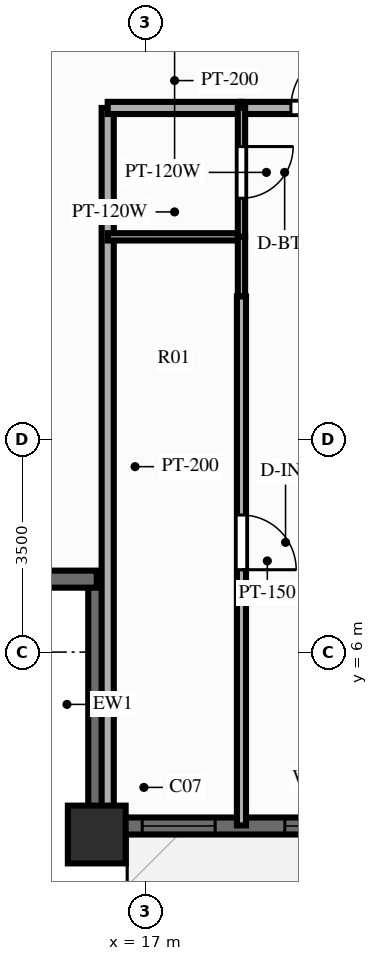
"""IFC4 building model, lengths in metres.
Left out: names, types, materials, properties, quantities, classifications, styles, units other than length and angle.
Written with IfcOpenShell. Run it as: python <this file> out.ifc"""

import sys

from ifc_helpers import new_model, si_unit, direction, frame, frame_2d, origin, origin_2d, place, context, subcontext, project, spatial, rectangle, extrude, source, transform, mapped, element, fill, save


model = new_model("IFC4")
c1 = context("Model", 3, precision=1e-05, world=origin(), true_north=direction((0.0, 1.0)))
c2 = subcontext(c1, "Body", "Model", "MODEL_VIEW")
j1 = project(units=[si_unit("LENGTHUNIT", "METRE"), si_unit("PLANEANGLEUNIT", "RADIAN")], contexts=[c1])
p1 = place(None, origin())
s1 = spatial("IfcSite", under=j1, at=p1, CompositionType="ELEMENT")
p2 = place(p1, origin())
s2 = spatial("IfcBuilding", under=s1, at=p2, CompositionType="ELEMENT")
p3 = place(p2, frame((0.0, 0.0, 77.85)))
s3 = spatial("IfcBuildingStorey", under=s2, at=p3, CompositionType="ELEMENT", Elevation=77.85)
m1 = source(origin(), c2, "Body", "SweptSolid", [
    extrude(rectangle(XDim=0.95, YDim=0.95, at=origin_2d()), origin(), (0.0, 0.0, 1.0), 3.0),
])
p4 = place(p3, frame((16.2, 3.0, 0.0), z_axis=(0.0, 0.0, 1.0), x_axis=(1.0, 0.0, 0.0)))
e1 = element("IfcColumn", 1, at=p4, inside=s3, PredefinedType="COLUMN", context=c2, shape_type="MappedRepresentation", body=[
    mapped(m1, transform((0.0, 0.0, 0.0), scale=1.0)),
])
p5 = place(p3, frame((16.2, 3.14, 0.0), z_axis=(0.0, 0.0, 1.0), x_axis=(1.0, 0.0, 0.0)))
e2 = element("IfcWall", 2, at=p5, inside=s3, PredefinedType="SOLIDWALL", context=c2, shape_type="SweptSolid", body=[
    extrude(rectangle(XDim=43.6, YDim=0.28, at=frame_2d((21.8, 0.0))), origin(), (0.0, 0.0, 1.0), 2.28),
])
p6 = place(p5, frame((0.748, 0.0, 0.25)))
e3 = element("IfcOpeningElement", 3, at=p6, cuts=e2, PredefinedType="OPENING", context=c2, shape_type="SweptSolid", body=[
    extrude(rectangle(XDim=1.2, YDim=1.5, at=frame_2d((0.6, 0.75))), frame((0.0, 0.152, 0.0), z_axis=(0.0, -1.0, 0.0), x_axis=(1.0, 0.0, 0.0)), (0.0, 0.0, 1.0), 0.304),
])
p7 = place(p5, frame((3.093, 0.0, 0.25)))
e4 = element("IfcOpeningElement", 4, at=p7, cuts=e2, PredefinedType="OPENING", context=c2, shape_type="SweptSolid", body=[
    extrude(rectangle(XDim=1.2, YDim=1.5, at=frame_2d((0.6, 0.75))), frame((0.0, 0.152, 0.0), z_axis=(0.0, -1.0, 0.0), x_axis=(1.0, 0.0, 0.0)), (0.0, 0.0, 1.0), 0.304),
])
p8 = place(p5, frame((5.885, 0.0, 0.25)))
e5 = element("IfcOpeningElement", 5, at=p8, cuts=e2, PredefinedType="OPENING", context=c2, shape_type="SweptSolid", body=[
    extrude(rectangle(XDim=1.2, YDim=1.5, at=frame_2d((0.6, 0.75))), frame((0.0, 0.152, 0.0), z_axis=(0.0, -1.0, 0.0), x_axis=(1.0, 0.0, 0.0)), (0.0, 0.0, 1.0), 0.304),
])
p9 = place(p5, frame((8.463, 0.0, 0.25)))
e6 = element("IfcOpeningElement", 6, at=p9, cuts=e2, PredefinedType="OPENING", context=c2, shape_type="SweptSolid", body=[
    extrude(rectangle(XDim=1.2, YDim=1.5, at=frame_2d((0.6, 0.75))), frame((0.0, 0.152, 0.0), z_axis=(0.0, -1.0, 0.0), x_axis=(1.0, 0.0, 0.0)), (0.0, 0.0, 1.0), 0.304),
])
p10 = place(p5, frame((10.876, 0.0, 0.25)))
e7 = element("IfcOpeningElement", 7, at=p10, cuts=e2, PredefinedType="OPENING", context=c2, shape_type="SweptSolid", body=[
    extrude(rectangle(XDim=1.2, YDim=1.5, at=frame_2d((0.6, 0.75))), frame((0.0, 0.152, 0.0), z_axis=(0.0, -1.0, 0.0), x_axis=(1.0, 0.0, 0.0)), (0.0, 0.0, 1.0), 0.304),
])
p11 = place(p5, frame((13.287, 0.0, 0.25)))
e8 = element("IfcOpeningElement", 8, at=p11, cuts=e2, PredefinedType="OPENING", context=c2, shape_type="SweptSolid", body=[
    extrude(rectangle(XDim=1.2, YDim=1.5, at=frame_2d((0.6, 0.75))), frame((0.0, 0.152, 0.0), z_axis=(0.0, -1.0, 0.0), x_axis=(1.0, 0.0, 0.0)), (0.0, 0.0, 1.0), 0.304),
])
p12 = place(p5, frame((16.521, 0.0, 0.25)))
e9 = element("IfcOpeningElement", 9, at=p12, cuts=e2, PredefinedType="OPENING", context=c2, shape_type="SweptSolid", body=[
    extrude(rectangle(XDim=1.2, YDim=1.5, at=frame_2d((0.6, 0.75))), frame((0.0, 0.152, 0.0), z_axis=(0.0, -1.0, 0.0), x_axis=(1.0, 0.0, 0.0)), (0.0, 0.0, 1.0), 0.304),
])
p13 = place(p5, frame((22.938, 0.0, 0.0), z_axis=(0.0, 0.0, 1.0), x_axis=(-1.0, 0.0, 0.0)))
e10 = element("IfcOpeningElement", 10, at=p13, cuts=e2, PredefinedType="OPENING", context=c2, shape_type="SweptSolid", body=[
    extrude(rectangle(XDim=1.1, YDim=2.15, at=frame_2d((0.55, 1.075))), frame((0.0, 0.152, 0.0), z_axis=(0.0, -1.0, 0.0), x_axis=(1.0, 0.0, 0.0)), (0.0, 0.0, 1.0), 0.304),
])
p14 = place(p5, frame((26.657, 0.0, 0.25)))
e11 = element("IfcOpeningElement", 11, at=p14, cuts=e2, PredefinedType="OPENING", context=c2, shape_type="SweptSolid", body=[
    extrude(rectangle(XDim=0.95, YDim=1.5, at=frame_2d((0.475, 0.75))), frame((0.0, 0.152, 0.0), z_axis=(0.0, -1.0, 0.0), x_axis=(1.0, 0.0, 0.0)), (0.0, 0.0, 1.0), 0.304),
])
p15 = place(p5, frame((28.965, 0.0, 0.25)))
e12 = element("IfcOpeningElement", 12, at=p15, cuts=e2, PredefinedType="OPENING", context=c2, shape_type="SweptSolid", body=[
    extrude(rectangle(XDim=0.7, YDim=1.5, at=frame_2d((0.35, 0.75))), frame((0.0, 0.152, 0.0), z_axis=(0.0, -1.0, 0.0), x_axis=(1.0, 0.0, 0.0)), (0.0, 0.0, 1.0), 0.304),
])
p16 = place(p5, frame((31.158, 0.0, 0.25)))
e13 = element("IfcOpeningElement", 13, at=p16, cuts=e2, PredefinedType="OPENING", context=c2, shape_type="SweptSolid", body=[
    extrude(rectangle(XDim=1.2, YDim=1.5, at=frame_2d((0.6, 0.75))), frame((0.0, 0.152, 0.0), z_axis=(0.0, -1.0, 0.0), x_axis=(1.0, 0.0, 0.0)), (0.0, 0.0, 1.0), 0.304),
])
p17 = place(p5, frame((35.992, 0.0, 0.25)))
e14 = element("IfcOpeningElement", 14, at=p17, cuts=e2, PredefinedType="OPENING", context=c2, shape_type="SweptSolid", body=[
    extrude(rectangle(XDim=1.2, YDim=1.5, at=frame_2d((0.6, 0.75))), frame((0.0, 0.152, 0.0), z_axis=(0.0, -1.0, 0.0), x_axis=(1.0, 0.0, 0.0)), (0.0, 0.0, 1.0), 0.304),
])
p18 = place(p5, frame((40.885, 0.0, 0.25)))
e15 = element("IfcOpeningElement", 15, at=p18, cuts=e2, PredefinedType="OPENING", context=c2, shape_type="SweptSolid", body=[
    extrude(rectangle(XDim=1.2, YDim=1.5, at=frame_2d((0.6, 0.75))), frame((0.0, 0.152, 0.0), z_axis=(0.0, -1.0, 0.0), x_axis=(1.0, 0.0, 0.0)), (0.0, 0.0, 1.0), 0.304),
])
for number, where, z_axis, x_axis in (
    (16, (16.2, 3.08, 0.0), (0.0, 0.0, 1.0), (0.0, 1.0, 0.0)),
    (17, (12.08, 7.2, 0.0), (0.0, 0.0, 1.0), (1.0, 0.0, 0.0)),
):
    element("IfcWall", number, at=place(p3, frame(where, z_axis=z_axis, x_axis=x_axis)), inside=s3, PredefinedType="SOLIDWALL", context=c2, shape_type="SweptSolid", body=[
        extrude(rectangle(XDim=4.12, YDim=0.28, at=frame_2d((2.06, 0.0))), origin(), (0.0, 0.0, 1.0), 2.28),
    ])
p19 = place(p3, frame((16.38, 14.95, 0.0), z_axis=(0.0, 0.0, 1.0), x_axis=(0.0, -1.0, 0.0)))
e18 = element("IfcWall", 18, at=p19, inside=s3, PredefinedType="PARTITIONING", context=c2, shape_type="SweptSolid", body=[
    extrude(rectangle(XDim=11.8, YDim=0.2, at=frame_2d((5.9, 0.0))), origin(), (0.0, 0.0, 1.0), 2.79),
])
p20 = place(p3, frame((16.38, 14.95, 0.0), z_axis=(0.0, 0.0, 1.0), x_axis=(1.0, 0.0, 0.0)))
e19 = element("IfcWall", 19, at=p20, inside=s3, PredefinedType="PARTITIONING", context=c2, shape_type="SweptSolid", body=[
    extrude(rectangle(XDim=2.2, YDim=0.2, at=frame_2d((1.1, 0.0))), origin(), (0.0, 0.0, 1.0), 2.79),
])
p21 = place(p3, frame((18.58, 14.95, 0.0), z_axis=(0.0, 0.0, 1.0), x_axis=(1.0, 0.0, 0.0)))
e20 = element("IfcWall", 20, at=p21, inside=s3, PredefinedType="PARTITIONING", context=c2, shape_type="SweptSolid", body=[
    extrude(rectangle(XDim=2.625, YDim=0.2, at=frame_2d((1.313, 0.0))), origin(), (0.0, 0.0, 1.0), 2.79),
])
p22 = place(p21, frame((0.813, 0.0, 0.0)))
e21 = element("IfcOpeningElement", 21, at=p22, cuts=e20, PredefinedType="OPENING", context=c2, shape_type="SweptSolid", body=[
    extrude(rectangle(XDim=1.0, YDim=2.15, at=frame_2d((0.5, 1.075))), frame((0.0, 0.112, 0.0), z_axis=(0.0, -1.0, 0.0), x_axis=(1.0, 0.0, 0.0)), (0.0, 0.0, 1.0), 0.224),
])
p23 = place(p3, frame((16.38, 12.83, 0.0), z_axis=(0.0, 0.0, 1.0), x_axis=(1.0, 0.0, 0.0)))
e22 = element("IfcWall", 22, at=p23, inside=s3, PredefinedType="PARTITIONING", context=c2, shape_type="SweptSolid", body=[
    extrude(rectangle(XDim=2.2, YDim=0.12, at=frame_2d((1.1, 0.0))), origin(), (0.0, 0.0, 1.0), 2.79),
])
p24 = place(p3, frame((18.58, 14.95, 0.0), z_axis=(0.0, 0.0, 1.0), x_axis=(0.0, -1.0, 0.0)))
e23 = element("IfcWall", 23, at=p24, inside=s3, PredefinedType="PARTITIONING", context=c2, shape_type="SweptSolid", body=[
    extrude(rectangle(XDim=2.12, YDim=0.12, at=frame_2d((1.06, 0.0))), origin(), (0.0, 0.0, 1.0), 2.79),
])
p25 = place(p24, frame((0.635, 0.0, 0.0)))
e24 = element("IfcOpeningElement", 24, at=p25, cuts=e23, PredefinedType="OPENING", context=c2, shape_type="SweptSolid", body=[
    extrude(rectangle(XDim=0.85, YDim=2.05, at=frame_2d((0.425, 1.025))), frame((0.0, 0.072, 0.0), z_axis=(0.0, -1.0, 0.0), x_axis=(1.0, 0.0, 0.0)), (0.0, 0.0, 1.0), 0.144),
])
p26 = place(p3, frame((18.58, 12.83, 0.0), z_axis=(0.0, 0.0, 1.0), x_axis=(0.0, -1.0, 0.0)))
e25 = element("IfcWall", 25, at=p26, inside=s3, PredefinedType="PARTITIONING", context=c2, shape_type="SweptSolid", body=[
    extrude(rectangle(XDim=0.98, YDim=0.12, at=frame_2d((0.49, 0.0))), origin(), (0.0, 0.0, 1.0), 2.79),
])
p27 = place(p3, frame((18.58, 11.85, 0.0), z_axis=(0.0, 0.0, 1.0), x_axis=(0.0, -1.0, 0.0)))
e26 = element("IfcWall", 26, at=p27, inside=s3, PredefinedType="PARTITIONING", context=c2, shape_type="SweptSolid", body=[
    extrude(rectangle(XDim=8.7, YDim=0.15, at=frame_2d((4.35, 0.0))), origin(), (0.0, 0.0, 1.0), 2.79),
])
p28 = place(p27, frame((3.595, 0.0, 0.0)))
e27 = element("IfcOpeningElement", 27, at=p28, cuts=e26, PredefinedType="OPENING", context=c2, shape_type="SweptSolid", body=[
    extrude(rectangle(XDim=0.9, YDim=2.1, at=frame_2d((0.45, 1.05))), frame((0.0, 0.087, 0.0), z_axis=(0.0, -1.0, 0.0), x_axis=(1.0, 0.0, 0.0)), (0.0, 0.0, 1.0), 0.174),
])
m2 = source(origin(), c2, "Body", "SweptSolid", [
    extrude(rectangle(XDim=1.2, YDim=1.5, at=frame_2d((0.6, 0.75))), frame((0.0, 0.03, 0.0), z_axis=(0.0, -1.0, 0.0), x_axis=(1.0, 0.0, 0.0)), (0.0, 0.0, 1.0), 0.06),
])
p29 = place(p6, origin())
e28 = element("IfcWindow", 28, at=p29, inside=s3, PartitioningType="SINGLE_PANEL", PredefinedType="WINDOW", context=c2, shape_type="MappedRepresentation", body=[
    mapped(m2, transform((0.0, 0.0, 0.0), scale=1.0)),
])
fill(e3, e28)
p30 = place(p7, origin())
e29 = element("IfcWindow", 29, at=p30, inside=s3, PartitioningType="SINGLE_PANEL", PredefinedType="WINDOW", context=c2, shape_type="MappedRepresentation", body=[
    mapped(m2, transform((0.0, 0.0, 0.0), scale=1.0)),
])
fill(e4, e29)
m3 = source(origin(), c2, "Body", "SweptSolid", [
    extrude(rectangle(XDim=1.0, YDim=2.15, at=frame_2d((0.5, 1.075))), frame((0.0, 0.025, 0.0), z_axis=(0.0, -1.0, 0.0), x_axis=(1.0, 0.0, 0.0)), (0.0, 0.0, 1.0), 0.05),
])
p31 = place(p22, origin())
e30 = element("IfcDoor", 30, at=p31, inside=s3, OperationType="SINGLE_SWING_RIGHT", PredefinedType="DOOR", context=c2, shape_type="MappedRepresentation", body=[
    mapped(m3, transform((0.0, 0.0, 0.0), scale=1.0)),
])
fill(e21, e30)
m4 = source(origin(), c2, "Body", "SweptSolid", [
    extrude(rectangle(XDim=0.85, YDim=2.05, at=frame_2d((0.425, 1.025))), frame((0.0, 0.025, 0.0), z_axis=(0.0, -1.0, 0.0), x_axis=(1.0, 0.0, 0.0)), (0.0, 0.0, 1.0), 0.05),
])
p32 = place(p25, origin())
e31 = element("IfcDoor", 31, at=p32, inside=s3, OperationType="SINGLE_SWING_LEFT", PredefinedType="DOOR", context=c2, shape_type="MappedRepresentation", body=[
    mapped(m4, transform((0.0, 0.0, 0.0), scale=1.0)),
])
fill(e24, e31)
m5 = source(origin(), c2, "Body", "SweptSolid", [
    extrude(rectangle(XDim=0.9, YDim=2.1, at=frame_2d((0.45, 1.05))), frame((0.0, 0.025, 0.0), z_axis=(0.0, -1.0, 0.0), x_axis=(1.0, 0.0, 0.0)), (0.0, 0.0, 1.0), 0.05),
])
p33 = place(p28, origin())
e32 = element("IfcDoor", 32, at=p33, inside=s3, OperationType="SINGLE_SWING_RIGHT", PredefinedType="DOOR", context=c2, shape_type="MappedRepresentation", body=[
    mapped(m5, transform((0.0, 0.0, 0.0), scale=1.0)),
])
fill(e27, e32)
save(model, sys.argv[1])
